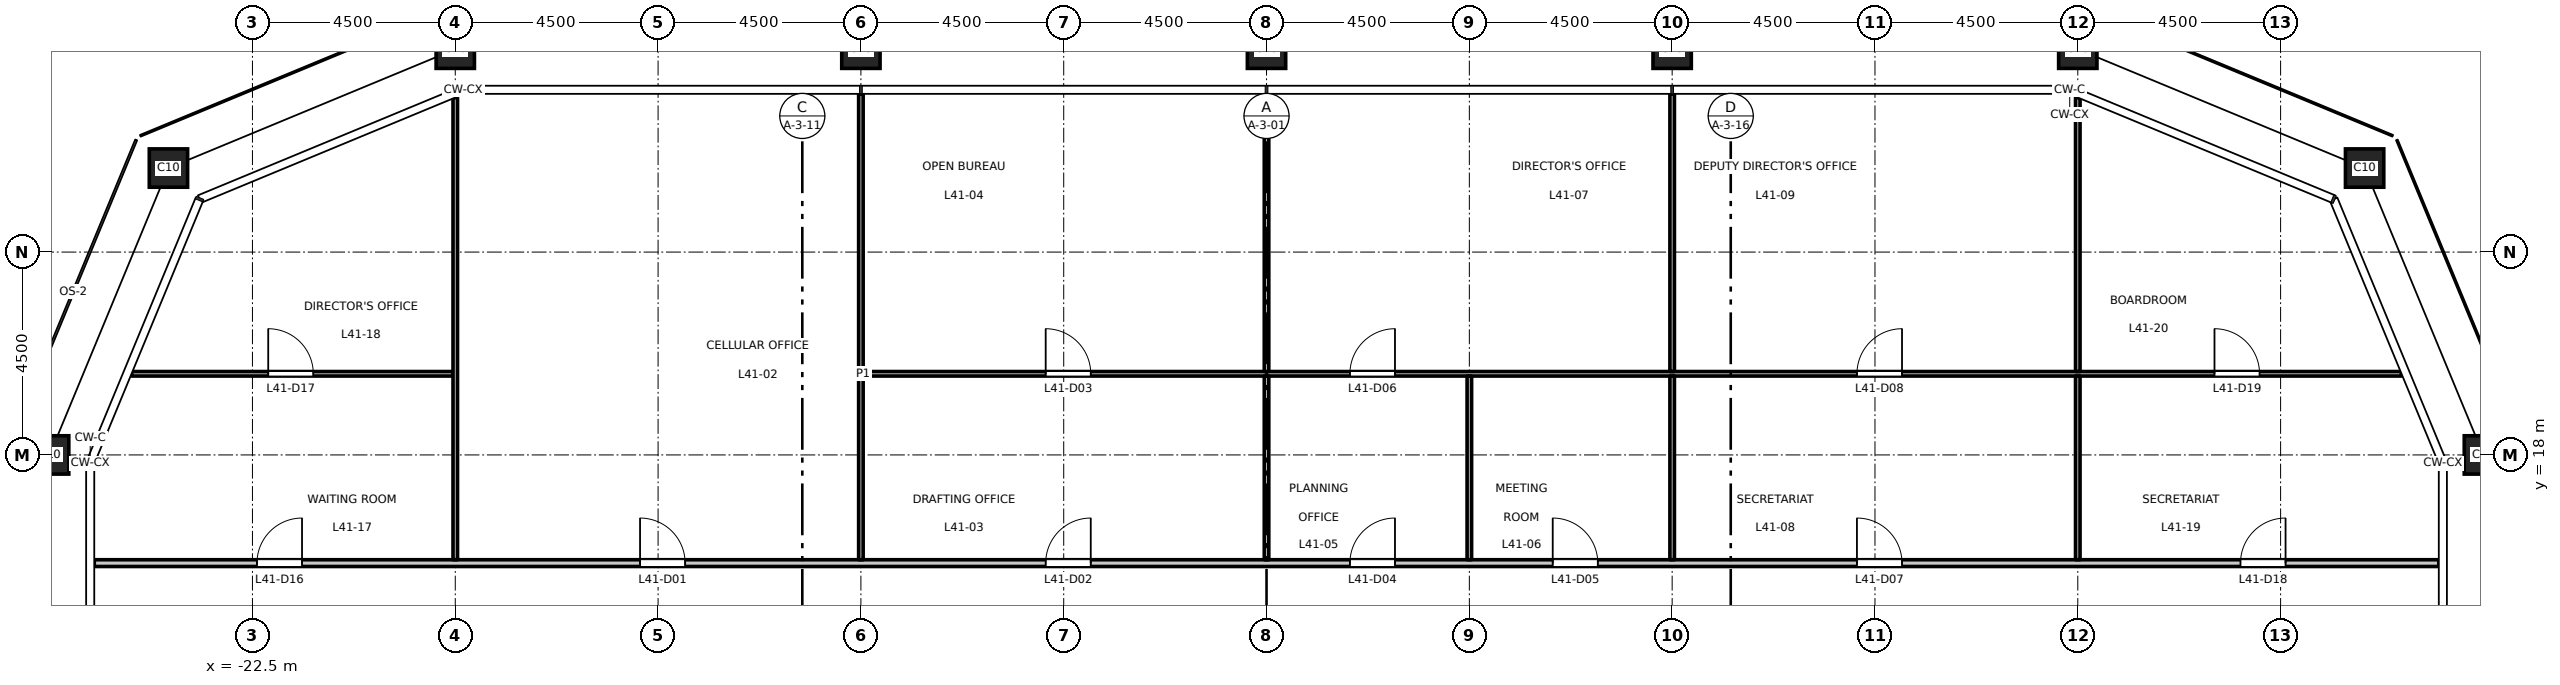
"""IFC4 building model, lengths in metres.
Left out: names, types, materials, properties, quantities, classifications, styles, units other than length and angle.
Written with IfcOpenShell. Run it as: python <this file> out.ifc"""

import sys

from ifc_helpers import new_model, si_unit, direction, frame, frame_2d, origin, origin_2d, place, context, subcontext, project, spatial, rectangle, hollow_rectangle, extrude, element, fill, save


model = new_model("IFC4")
c1 = context("Model", 3, precision=1e-05, world=origin(), true_north=direction((0.0, 1.0)))
c2 = subcontext(c1, "Body", "Model", "MODEL_VIEW")
j1 = project(units=[si_unit("LENGTHUNIT", "METRE"), si_unit("PLANEANGLEUNIT", "RADIAN")], contexts=[c1])
p1 = place(None, origin())
s1 = spatial("IfcSite", under=j1, at=p1, CompositionType="ELEMENT")
p2 = place(p1, origin())
s2 = spatial("IfcBuilding", under=s1, at=p2, CompositionType="ELEMENT")
p3 = place(p2, frame((0.0, 0.0, 192.7)))
s3 = spatial("IfcBuildingStorey", under=s2, at=p3, CompositionType="ELEMENT", Elevation=192.7)
for number, where, z_axis, x_axis in (
    (1, (27.0, 18.0, 0.0), (0.0, 0.0, 1.0), (1.0, 0.0, 0.0)),
    (2, (24.364, 24.364, 0.0), (0.0, 0.0, 1.0), (1.0, 0.0, 0.0)),
    (3, (18.0, 27.0, 0.0), (0.0, 0.0, 1.0), (1.0, 0.0, 0.0)),
    (4, (9.0, 27.0, 0.0), (0.0, 0.0, 1.0), (1.0, 0.0, 0.0)),
    (5, (0.0, 27.0, 0.0), (0.0, 0.0, 1.0), (1.0, 0.0, 0.0)),
    (6, (-9.0, 27.0, 0.0), (0.0, 0.0, 1.0), (1.0, 0.0, 0.0)),
    (7, (-18.0, 27.0, 0.0), (0.0, 0.0, 1.0), (1.0, 0.0, 0.0)),
    (8, (-24.364, 24.364, 0.0), (0.0, 0.0, 1.0), (1.0, 0.0, 0.0)),
    (9, (-27.0, 18.0, 0.0), (0.0, 0.0, 1.0), (1.0, 0.0, 0.0)),
):
    element("IfcColumn", number, at=place(p3, frame(where, z_axis=z_axis, x_axis=x_axis)), inside=s3, PredefinedType="COLUMN", context=c2, shape_type="SweptSolid", body=[
        extrude(hollow_rectangle(XDim=0.85, YDim=0.85, WallThickness=0.05, at=origin_2d()), origin(), (0.0, 0.0, 1.0), 4.5),
    ])
p4 = place(p3, frame((-26.01, 15.6, 0.0), z_axis=(0.0, 0.0, 1.0), x_axis=(1.0, 0.0, 0.0)))
e10 = element("IfcWall", 10, at=p4, inside=s3, PredefinedType="PARTITIONING", context=c2, shape_type="SweptSolid", body=[
    extrude(rectangle(XDim=52.02, YDim=0.15, at=frame_2d((26.01, 0.0))), origin(), (0.0, 0.0, 1.0), 4.35),
])
p5 = place(p4, frame((12.11, 0.0, 0.0)))
e11 = element("IfcOpeningElement", 11, at=p5, cuts=e10, PredefinedType="OPENING", context=c2, shape_type="SweptSolid", body=[
    extrude(rectangle(XDim=1.0, YDim=2.1, at=frame_2d((0.5, 1.05))), frame((0.0, 0.085, 0.0), z_axis=(0.0, -1.0, 0.0), x_axis=(1.0, 0.0, 0.0)), (0.0, 0.0, 1.0), 0.17),
])
p6 = place(p4, frame((21.11, 0.0, 0.0)))
e12 = element("IfcOpeningElement", 12, at=p6, cuts=e10, PredefinedType="OPENING", context=c2, shape_type="SweptSolid", body=[
    extrude(rectangle(XDim=1.0, YDim=2.1, at=frame_2d((0.5, 1.05))), frame((0.0, 0.085, 0.0), z_axis=(0.0, -1.0, 0.0), x_axis=(1.0, 0.0, 0.0)), (0.0, 0.0, 1.0), 0.17),
])
p7 = place(p4, frame((27.86, 0.0, 0.0)))
e13 = element("IfcOpeningElement", 13, at=p7, cuts=e10, PredefinedType="OPENING", context=c2, shape_type="SweptSolid", body=[
    extrude(rectangle(XDim=1.0, YDim=2.1, at=frame_2d((0.5, 1.05))), frame((0.0, 0.085, 0.0), z_axis=(0.0, -1.0, 0.0), x_axis=(1.0, 0.0, 0.0)), (0.0, 0.0, 1.0), 0.17),
])
p8 = place(p4, frame((32.36, 0.0, 0.0)))
e14 = element("IfcOpeningElement", 14, at=p8, cuts=e10, PredefinedType="OPENING", context=c2, shape_type="SweptSolid", body=[
    extrude(rectangle(XDim=1.0, YDim=2.1, at=frame_2d((0.5, 1.05))), frame((0.0, 0.085, 0.0), z_axis=(0.0, -1.0, 0.0), x_axis=(1.0, 0.0, 0.0)), (0.0, 0.0, 1.0), 0.17),
])
p9 = place(p4, frame((39.11, 0.0, 0.0)))
e15 = element("IfcOpeningElement", 15, at=p9, cuts=e10, PredefinedType="OPENING", context=c2, shape_type="SweptSolid", body=[
    extrude(rectangle(XDim=1.0, YDim=2.1, at=frame_2d((0.5, 1.05))), frame((0.0, 0.085, 0.0), z_axis=(0.0, -1.0, 0.0), x_axis=(1.0, 0.0, 0.0)), (0.0, 0.0, 1.0), 0.17),
])
p10 = place(p4, frame((3.61, 0.0, 0.0)))
e16 = element("IfcOpeningElement", 16, at=p10, cuts=e10, PredefinedType="OPENING", context=c2, shape_type="SweptSolid", body=[
    extrude(rectangle(XDim=1.0, YDim=2.1, at=frame_2d((0.5, 1.05))), frame((0.0, 0.085, 0.0), z_axis=(0.0, -1.0, 0.0), x_axis=(1.0, 0.0, 0.0)), (0.0, 0.0, 1.0), 0.17),
])
p11 = place(p4, frame((47.62, 0.0, 0.0)))
e17 = element("IfcOpeningElement", 17, at=p11, cuts=e10, PredefinedType="OPENING", context=c2, shape_type="SweptSolid", body=[
    extrude(rectangle(XDim=1.0, YDim=2.1, at=frame_2d((0.5, 1.05))), frame((0.0, 0.085, 0.0), z_axis=(0.0, -1.0, 0.0), x_axis=(1.0, 0.0, 0.0)), (0.0, 0.0, 1.0), 0.17),
])
p12 = place(p3, frame((-25.183, 19.8, 0.0), z_axis=(0.0, 0.0, 1.0), x_axis=(1.0, 0.0, 0.0)))
e18 = element("IfcWall", 18, at=p12, inside=s3, PredefinedType="PARTITIONING", context=c2, shape_type="SweptSolid", body=[
    extrude(rectangle(XDim=7.133, YDim=0.1, at=frame_2d((3.566, 0.0))), origin(), (0.0, 0.0, 1.0), 4.35),
])
p13 = place(p12, frame((3.033, 0.0, 0.0)))
e19 = element("IfcOpeningElement", 19, at=p13, cuts=e18, PredefinedType="OPENING", context=c2, shape_type="SweptSolid", body=[
    extrude(rectangle(XDim=1.0, YDim=2.1, at=frame_2d((0.5, 1.05))), frame((0.0, 0.06, 0.0), z_axis=(0.0, -1.0, 0.0), x_axis=(1.0, 0.0, 0.0)), (0.0, 0.0, 1.0), 0.12),
])
p14 = place(p3, frame((-8.95, 19.8, 0.0), z_axis=(0.0, 0.0, 1.0), x_axis=(1.0, 0.0, 0.0)))
e20 = element("IfcWall", 20, at=p14, inside=s3, PredefinedType="PARTITIONING", context=c2, shape_type="SweptSolid", body=[
    extrude(rectangle(XDim=34.133, YDim=0.1, at=frame_2d((17.066, 0.0))), origin(), (0.0, 0.0, 1.0), 4.35),
])
p15 = place(p14, frame((4.05, 0.0, 0.0)))
e21 = element("IfcOpeningElement", 21, at=p15, cuts=e20, PredefinedType="OPENING", context=c2, shape_type="SweptSolid", body=[
    extrude(rectangle(XDim=1.0, YDim=2.1, at=frame_2d((0.5, 1.05))), frame((0.0, 0.06, 0.0), z_axis=(0.0, -1.0, 0.0), x_axis=(1.0, 0.0, 0.0)), (0.0, 0.0, 1.0), 0.12),
])
p16 = place(p14, frame((10.8, 0.0, 0.0)))
e22 = element("IfcOpeningElement", 22, at=p16, cuts=e20, PredefinedType="OPENING", context=c2, shape_type="SweptSolid", body=[
    extrude(rectangle(XDim=1.0, YDim=2.1, at=frame_2d((0.5, 1.05))), frame((0.0, 0.06, 0.0), z_axis=(0.0, -1.0, 0.0), x_axis=(1.0, 0.0, 0.0)), (0.0, 0.0, 1.0), 0.12),
])
p17 = place(p14, frame((22.05, 0.0, 0.0)))
e23 = element("IfcOpeningElement", 23, at=p17, cuts=e20, PredefinedType="OPENING", context=c2, shape_type="SweptSolid", body=[
    extrude(rectangle(XDim=1.0, YDim=2.1, at=frame_2d((0.5, 1.05))), frame((0.0, 0.06, 0.0), z_axis=(0.0, -1.0, 0.0), x_axis=(1.0, 0.0, 0.0)), (0.0, 0.0, 1.0), 0.12),
])
p18 = place(p14, frame((29.983, 0.0, 0.0)))
e24 = element("IfcOpeningElement", 24, at=p18, cuts=e20, PredefinedType="OPENING", context=c2, shape_type="SweptSolid", body=[
    extrude(rectangle(XDim=1.0, YDim=2.1, at=frame_2d((0.5, 1.05))), frame((0.0, 0.06, 0.0), z_axis=(0.0, -1.0, 0.0), x_axis=(1.0, 0.0, 0.0)), (0.0, 0.0, 1.0), 0.12),
])
p19 = place(p3, frame((-18.0, 15.675, 0.0), z_axis=(0.0, 0.0, 1.0), x_axis=(0.0, 1.0, 0.0)))
e25 = element("IfcWall", 25, at=p19, inside=s3, PredefinedType="PARTITIONING", context=c2, shape_type="SweptSolid", body=[
    extrude(rectangle(XDim=10.253, YDim=0.1, at=frame_2d((5.126, 0.0))), origin(), (0.0, 0.0, 1.0), 3.65),
])
p20 = place(p3, frame((-9.0, 15.675, 0.0), z_axis=(0.0, 0.0, 1.0), x_axis=(0.0, 1.0, 0.0)))
e26 = element("IfcWall", 26, at=p20, inside=s3, PredefinedType="PARTITIONING", context=c2, shape_type="SweptSolid", body=[
    extrude(rectangle(XDim=10.335, YDim=0.1, at=frame_2d((5.167, 0.0))), origin(), (0.0, 0.0, 1.0), 3.65),
])
p21 = place(p3, frame((0.0, 15.675, 0.0), z_axis=(0.0, 0.0, 1.0), x_axis=(0.0, 1.0, 0.0)))
e27 = element("IfcWall", 27, at=p21, inside=s3, PredefinedType="PARTITIONING", context=c2, shape_type="SweptSolid", body=[
    extrude(rectangle(XDim=4.075, YDim=0.1, at=frame_2d((2.038, 0.0))), origin(), (0.0, 0.0, 1.0), 3.55),
])
p22 = place(p3, frame((0.0, 19.85, 0.0), z_axis=(0.0, 0.0, 1.0), x_axis=(0.0, 1.0, 0.0)))
e28 = element("IfcWall", 28, at=p22, inside=s3, PredefinedType="PARTITIONING", context=c2, shape_type="SweptSolid", body=[
    extrude(rectangle(XDim=6.16, YDim=0.1, at=frame_2d((3.08, 0.0))), origin(), (0.0, 0.0, 1.0), 3.55),
])
p23 = place(p3, frame((4.5, 15.675, 0.0), z_axis=(0.0, 0.0, 1.0), x_axis=(0.0, 1.0, 0.0)))
e29 = element("IfcWall", 29, at=p23, inside=s3, PredefinedType="PARTITIONING", context=c2, shape_type="SweptSolid", body=[
    extrude(rectangle(XDim=4.075, YDim=0.1, at=frame_2d((2.038, 0.0))), origin(), (0.0, 0.0, 1.0), 4.35),
])
p24 = place(p3, frame((9.0, 15.675, 0.0), z_axis=(0.0, 0.0, 1.0), x_axis=(0.0, 1.0, 0.0)))
e30 = element("IfcWall", 30, at=p24, inside=s3, PredefinedType="PARTITIONING", context=c2, shape_type="SweptSolid", body=[
    extrude(rectangle(XDim=4.075, YDim=0.1, at=frame_2d((2.038, 0.0))), origin(), (0.0, 0.0, 1.0), 3.65),
])
p25 = place(p3, frame((9.0, 19.85, 0.0), z_axis=(0.0, 0.0, 1.0), x_axis=(0.0, 1.0, 0.0)))
e31 = element("IfcWall", 31, at=p25, inside=s3, PredefinedType="PARTITIONING", context=c2, shape_type="SweptSolid", body=[
    extrude(rectangle(XDim=6.16, YDim=0.1, at=frame_2d((3.08, 0.0))), origin(), (0.0, 0.0, 1.0), 3.65),
])
p26 = place(p3, frame((18.0, 15.675, 0.0), z_axis=(0.0, 0.0, 1.0), x_axis=(0.0, 1.0, 0.0)))
e32 = element("IfcWall", 32, at=p26, inside=s3, PredefinedType="PARTITIONING", context=c2, shape_type="SweptSolid", body=[
    extrude(rectangle(XDim=4.075, YDim=0.1, at=frame_2d((2.038, 0.0))), origin(), (0.0, 0.0, 1.0), 3.65),
])
p27 = place(p3, frame((18.0, 19.85, 0.0), z_axis=(0.0, 0.0, 1.0), x_axis=(0.0, 1.0, 0.0)))
e33 = element("IfcWall", 33, at=p27, inside=s3, PredefinedType="PARTITIONING", context=c2, shape_type="SweptSolid", body=[
    extrude(rectangle(XDim=6.078, YDim=0.1, at=frame_2d((3.039, 0.0))), origin(), (0.0, 0.0, 1.0), 3.65),
])
p28 = place(p5, origin())
e34 = element("IfcDoor", 34, at=p28, inside=s3, OperationType="SINGLE_SWING_LEFT", PredefinedType="DOOR", context=c2, shape_type="SweptSolid", body=[
    extrude(rectangle(XDim=1.0, YDim=2.1, at=frame_2d((0.5, 1.05))), frame((0.0, 0.025, 0.0), z_axis=(0.0, -1.0, 0.0), x_axis=(1.0, 0.0, 0.0)), (0.0, 0.0, 1.0), 0.05),
])
fill(e11, e34)
p29 = place(p6, origin())
e35 = element("IfcDoor", 35, at=p29, inside=s3, OperationType="SINGLE_SWING_RIGHT", PredefinedType="DOOR", context=c2, shape_type="SweptSolid", body=[
    extrude(rectangle(XDim=1.0, YDim=2.1, at=frame_2d((0.5, 1.05))), frame((0.0, 0.025, 0.0), z_axis=(0.0, -1.0, 0.0), x_axis=(1.0, 0.0, 0.0)), (0.0, 0.0, 1.0), 0.05),
])
fill(e12, e35)
p30 = place(p15, origin())
e36 = element("IfcDoor", 36, at=p30, inside=s3, OperationType="SINGLE_SWING_LEFT", PredefinedType="DOOR", context=c2, shape_type="SweptSolid", body=[
    extrude(rectangle(XDim=1.0, YDim=2.1, at=frame_2d((0.5, 1.05))), frame((0.0, 0.025, 0.0), z_axis=(0.0, -1.0, 0.0), x_axis=(1.0, 0.0, 0.0)), (0.0, 0.0, 1.0), 0.05),
])
fill(e21, e36)
p31 = place(p7, origin())
e37 = element("IfcDoor", 37, at=p31, inside=s3, OperationType="SINGLE_SWING_RIGHT", PredefinedType="DOOR", context=c2, shape_type="SweptSolid", body=[
    extrude(rectangle(XDim=1.0, YDim=2.1, at=frame_2d((0.5, 1.05))), frame((0.0, 0.025, 0.0), z_axis=(0.0, -1.0, 0.0), x_axis=(1.0, 0.0, 0.0)), (0.0, 0.0, 1.0), 0.05),
])
fill(e13, e37)
p32 = place(p8, origin())
e38 = element("IfcDoor", 38, at=p32, inside=s3, OperationType="SINGLE_SWING_LEFT", PredefinedType="DOOR", context=c2, shape_type="SweptSolid", body=[
    extrude(rectangle(XDim=1.0, YDim=2.1, at=frame_2d((0.5, 1.05))), frame((0.0, 0.025, 0.0), z_axis=(0.0, -1.0, 0.0), x_axis=(1.0, 0.0, 0.0)), (0.0, 0.0, 1.0), 0.05),
])
fill(e14, e38)
p33 = place(p16, origin())
e39 = element("IfcDoor", 39, at=p33, inside=s3, OperationType="SINGLE_SWING_RIGHT", PredefinedType="DOOR", context=c2, shape_type="SweptSolid", body=[
    extrude(rectangle(XDim=1.0, YDim=2.1, at=frame_2d((0.5, 1.05))), frame((0.0, 0.025, 0.0), z_axis=(0.0, -1.0, 0.0), x_axis=(1.0, 0.0, 0.0)), (0.0, 0.0, 1.0), 0.05),
])
fill(e22, e39)
p34 = place(p9, origin())
e40 = element("IfcDoor", 40, at=p34, inside=s3, OperationType="SINGLE_SWING_LEFT", PredefinedType="DOOR", context=c2, shape_type="SweptSolid", body=[
    extrude(rectangle(XDim=1.0, YDim=2.1, at=frame_2d((0.5, 1.05))), frame((0.0, 0.025, 0.0), z_axis=(0.0, -1.0, 0.0), x_axis=(1.0, 0.0, 0.0)), (0.0, 0.0, 1.0), 0.05),
])
fill(e15, e40)
p35 = place(p17, origin())
e41 = element("IfcDoor", 41, at=p35, inside=s3, OperationType="SINGLE_SWING_RIGHT", PredefinedType="DOOR", context=c2, shape_type="SweptSolid", body=[
    extrude(rectangle(XDim=1.0, YDim=2.1, at=frame_2d((0.5, 1.05))), frame((0.0, 0.025, 0.0), z_axis=(0.0, -1.0, 0.0), x_axis=(1.0, 0.0, 0.0)), (0.0, 0.0, 1.0), 0.05),
])
fill(e23, e41)
p36 = place(p10, origin())
e42 = element("IfcDoor", 42, at=p36, inside=s3, OperationType="SINGLE_SWING_RIGHT", PredefinedType="DOOR", context=c2, shape_type="SweptSolid", body=[
    extrude(rectangle(XDim=1.0, YDim=2.1, at=frame_2d((0.5, 1.05))), frame((0.0, 0.025, 0.0), z_axis=(0.0, -1.0, 0.0), x_axis=(1.0, 0.0, 0.0)), (0.0, 0.0, 1.0), 0.05),
])
fill(e16, e42)
p37 = place(p13, origin())
e43 = element("IfcDoor", 43, at=p37, inside=s3, OperationType="SINGLE_SWING_LEFT", PredefinedType="DOOR", context=c2, shape_type="SweptSolid", body=[
    extrude(rectangle(XDim=1.0, YDim=2.1, at=frame_2d((0.5, 1.05))), frame((0.0, 0.025, 0.0), z_axis=(0.0, -1.0, 0.0), x_axis=(1.0, 0.0, 0.0)), (0.0, 0.0, 1.0), 0.05),
])
fill(e19, e43)
p38 = place(p11, origin())
e44 = element("IfcDoor", 44, at=p38, inside=s3, OperationType="SINGLE_SWING_RIGHT", PredefinedType="DOOR", context=c2, shape_type="SweptSolid", body=[
    extrude(rectangle(XDim=1.0, YDim=2.1, at=frame_2d((0.5, 1.05))), frame((0.0, 0.025, 0.0), z_axis=(0.0, -1.0, 0.0), x_axis=(1.0, 0.0, 0.0)), (0.0, 0.0, 1.0), 0.05),
])
fill(e17, e44)
p39 = place(p18, origin())
e45 = element("IfcDoor", 45, at=p39, inside=s3, OperationType="SINGLE_SWING_LEFT", PredefinedType="DOOR", context=c2, shape_type="SweptSolid", body=[
    extrude(rectangle(XDim=1.0, YDim=2.1, at=frame_2d((0.5, 1.05))), frame((0.0, 0.025, 0.0), z_axis=(0.0, -1.0, 0.0), x_axis=(1.0, 0.0, 0.0)), (0.0, 0.0, 1.0), 0.05),
])
fill(e24, e45)
save(model, sys.argv[1])
